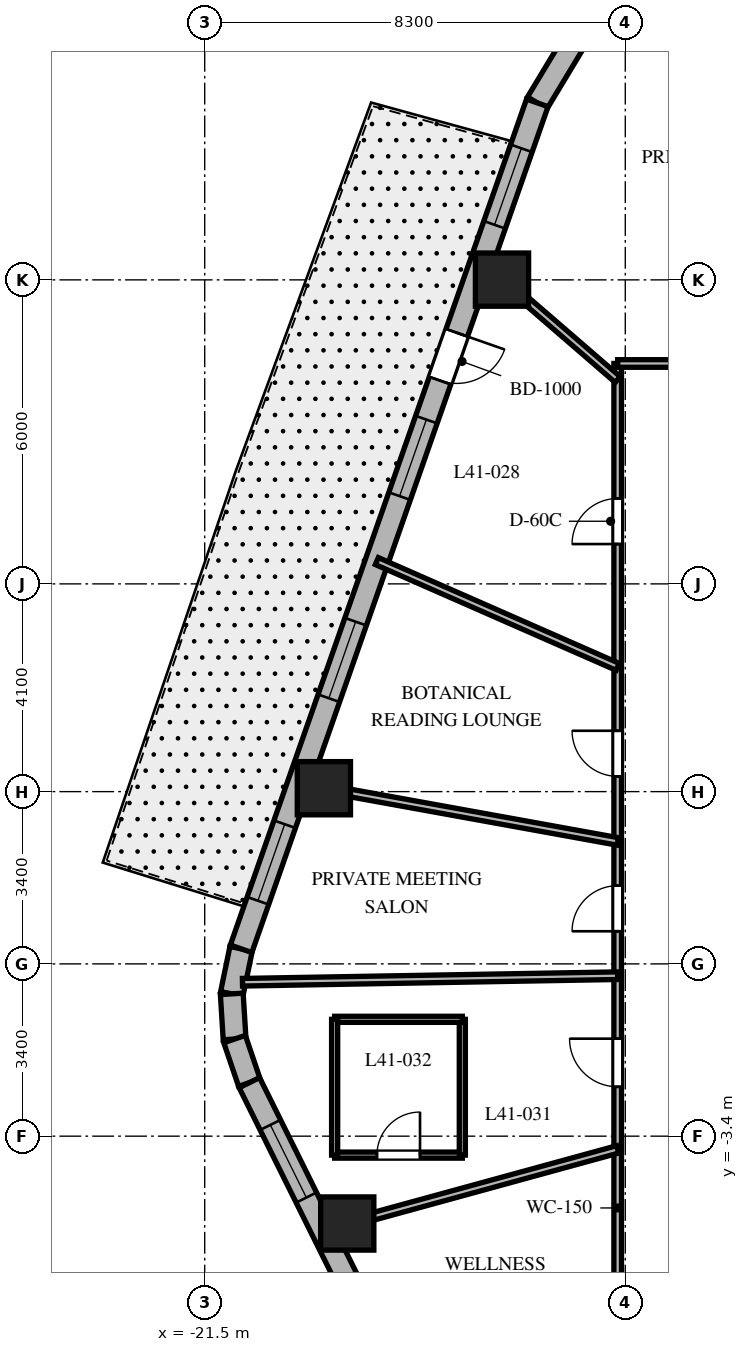
"""IFC4 building model, lengths in metres.
Left out: names, types, materials, properties, quantities, classifications, styles, units other than length and angle.
Written with IfcOpenShell. Run it as: python <this file> out.ifc"""

import sys

from ifc_helpers import new_model, si_unit, direction, frame, frame_2d, origin, origin_2d, place, context, subcontext, project, spatial, rectangle, extrude, element, fill, save


model = new_model("IFC4")
c1 = context("Model", 3, precision=1e-05, world=origin(), true_north=direction((0.0, 1.0)))
c2 = subcontext(c1, "Body", "Model", "MODEL_VIEW")
j1 = project(units=[si_unit("LENGTHUNIT", "METRE"), si_unit("PLANEANGLEUNIT", "RADIAN")], contexts=[c1])
p1 = place(None, origin())
s1 = spatial("IfcSite", under=j1, at=p1, CompositionType="ELEMENT")
p2 = place(p1, origin())
s2 = spatial("IfcBuilding", under=s1, at=p2, CompositionType="ELEMENT")
p3 = place(p2, frame((0.0, 0.0, 166.5)))
s3 = spatial("IfcBuildingStorey", under=s2, at=p3, CompositionType="ELEMENT", Elevation=166.5)
for number, where, z_axis, x_axis in (
    (1, (-15.633, 13.505, 0.0), (0.0, 0.0, 1.0), (1.0, 0.0, 0.0)),
    (2, (-19.148, 3.467, 0.0), (0.0, 0.0, 1.0), (1.0, 0.0, 0.0)),
    (3, (-18.687, -5.124, 0.0), (0.0, 0.0, 1.0), (1.0, 0.0, 0.0)),
):
    element("IfcColumn", number, at=place(p3, frame(where, z_axis=z_axis, x_axis=x_axis)), inside=s3, PredefinedType="COLUMN", context=c2, shape_type="SweptSolid", body=[
        extrude(rectangle(XDim=1.05, YDim=1.05, at=origin_2d()), origin(), (0.0, 0.0, 1.0), 3.7),
    ])
p4 = place(p3, frame((-14.214, 18.192, 0.0), z_axis=(0.0, 0.0, 1.0), x_axis=(-0.516340945502, -0.856383108193, 0.0)))
e4 = element("IfcWall", 4, at=p4, inside=s3, PredefinedType="SOLIDWALL", context=c2, shape_type="SweptSolid", body=[
    extrude(rectangle(XDim=1.4, YDim=0.45, at=frame_2d((0.7, 0.0))), origin(), (0.0, 0.0, 1.0), 3.38),
])
p5 = place(p3, frame((-20.782, 0.298, 0.0), z_axis=(0.0, 0.0, 1.0), x_axis=(-0.202570068411, -0.979267771033, 0.0)))
e5 = element("IfcWall", 5, at=p5, inside=s3, PredefinedType="SOLIDWALL", context=c2, shape_type="SweptSolid", body=[
    extrude(rectangle(XDim=0.909, YDim=0.45, at=frame_2d((0.454, 0.0))), origin(), (0.0, 0.0, 1.0), 3.38),
])
p6 = place(p3, frame((-20.966, -0.592, 0.0), z_axis=(0.0, 0.0, 1.0), x_axis=(0.061748898935, -0.998091715966, 0.0)))
e6 = element("IfcWall", 6, at=p6, inside=s3, PredefinedType="SOLIDWALL", context=c2, shape_type="SweptSolid", body=[
    extrude(rectangle(XDim=0.894, YDim=0.45, at=frame_2d((0.447, 0.0))), origin(), (0.0, 0.0, 1.0), 3.38),
])
p7 = place(p3, frame((-20.911, -1.484, 0.0), z_axis=(0.0, 0.0, 1.0), x_axis=(0.321623334353, -0.946867694453, 0.0)))
e7 = element("IfcWall", 7, at=p7, inside=s3, PredefinedType="SOLIDWALL", context=c2, shape_type="SweptSolid", body=[
    extrude(rectangle(XDim=0.909, YDim=0.45, at=frame_2d((0.454, 0.0))), origin(), (0.0, 0.0, 1.0), 3.38),
])
p8 = place(p3, frame((-14.937, 16.993, 0.0), z_axis=(0.0, 0.0, 1.0), x_axis=(-0.330431575061, -0.943829949834, 0.0)))
e8 = element("IfcWall", 8, at=p8, inside=s3, PredefinedType="SOLIDWALL", context=c2, shape_type="SweptSolid", body=[
    extrude(rectangle(XDim=17.689, YDim=0.45, at=frame_2d((8.844, 0.0))), origin(), (0.0, 0.0, 1.0), 3.38),
])
p9 = place(p8, frame((4.807, 0.0, 0.0)))
e9 = element("IfcOpeningElement", 9, at=p9, cuts=e8, PredefinedType="OPENING", context=c2, shape_type="SweptSolid", body=[
    extrude(rectangle(XDim=1.0, YDim=2.15, at=frame_2d((0.5, 1.075))), frame((0.0, 0.235, 0.0), z_axis=(0.0, -1.0, 0.0), x_axis=(1.0, 0.0, 0.0)), (0.0, 0.0, 1.0), 0.47),
])
p10 = place(p8, frame((0.95, 0.0, 0.8)))
e10 = element("IfcOpeningElement", 10, at=p10, cuts=e8, PredefinedType="OPENING", context=c2, shape_type="SweptSolid", body=[
    extrude(rectangle(XDim=1.6, YDim=1.75, at=frame_2d((0.8, 0.875))), frame((0.0, 0.235, 0.0), z_axis=(0.0, -1.0, 0.0), x_axis=(1.0, 0.0, 0.0)), (0.0, 0.0, 1.0), 0.47),
])
p11 = place(p8, frame((6.623, 0.0, 0.8)))
e11 = element("IfcOpeningElement", 11, at=p11, cuts=e8, PredefinedType="OPENING", context=c2, shape_type="SweptSolid", body=[
    extrude(rectangle(XDim=1.6, YDim=1.75, at=frame_2d((0.8, 0.875))), frame((0.0, 0.235, 0.0), z_axis=(0.0, -1.0, 0.0), x_axis=(1.0, 0.0, 0.0)), (0.0, 0.0, 1.0), 0.47),
])
p12 = place(p8, frame((10.849, 0.0, 0.8)))
e12 = element("IfcOpeningElement", 12, at=p12, cuts=e8, PredefinedType="OPENING", context=c2, shape_type="SweptSolid", body=[
    extrude(rectangle(XDim=1.6, YDim=1.75, at=frame_2d((0.8, 0.875))), frame((0.0, 0.235, 0.0), z_axis=(0.0, -1.0, 0.0), x_axis=(1.0, 0.0, 0.0)), (0.0, 0.0, 1.0), 0.47),
])
p13 = place(p8, frame((15.084, 0.0, 0.8)))
e13 = element("IfcOpeningElement", 13, at=p13, cuts=e8, PredefinedType="OPENING", context=c2, shape_type="SweptSolid", body=[
    extrude(rectangle(XDim=1.6, YDim=1.75, at=frame_2d((0.8, 0.875))), frame((0.0, 0.235, 0.0), z_axis=(0.0, -1.0, 0.0), x_axis=(1.0, 0.0, 0.0)), (0.0, 0.0, 1.0), 0.47),
])
p14 = place(p3, frame((-20.618, -2.344, 0.0), z_axis=(0.0, 0.0, 1.0), x_axis=(0.444243691097, -0.895905990002, 0.0)))
e14 = element("IfcWall", 14, at=p14, inside=s3, PredefinedType="SOLIDWALL", context=c2, shape_type="SweptSolid", body=[
    extrude(rectangle(XDim=16.784, YDim=0.45, at=frame_2d((8.392, 0.0))), origin(), (0.0, 0.0, 1.0), 3.38),
])
p15 = place(p14, frame((0.931, 0.0, 0.8)))
e15 = element("IfcOpeningElement", 15, at=p15, cuts=e14, PredefinedType="OPENING", context=c2, shape_type="SweptSolid", body=[
    extrude(rectangle(XDim=1.6, YDim=1.75, at=frame_2d((0.8, 0.875))), frame((0.0, 0.235, 0.0), z_axis=(0.0, -1.0, 0.0), x_axis=(1.0, 0.0, 0.0)), (0.0, 0.0, 1.0), 0.47),
])
p16 = place(p14, frame((7.642, 0.0, 0.8)))
e16 = element("IfcOpeningElement", 16, at=p16, cuts=e14, PredefinedType="OPENING", context=c2, shape_type="SweptSolid", body=[
    extrude(rectangle(XDim=1.6, YDim=1.75, at=frame_2d((0.8, 0.875))), frame((0.0, 0.235, 0.0), z_axis=(0.0, -1.0, 0.0), x_axis=(1.0, 0.0, 0.0)), (0.0, 0.0, 1.0), 0.47),
])
p17 = place(p14, frame((14.303, 0.0, 0.8)))
e17 = element("IfcOpeningElement", 17, at=p17, cuts=e14, PredefinedType="OPENING", context=c2, shape_type="SweptSolid", body=[
    extrude(rectangle(XDim=1.6, YDim=1.75, at=frame_2d((0.8, 0.875))), frame((0.0, 0.235, 0.0), z_axis=(0.0, -1.0, 0.0), x_axis=(1.0, 0.0, 0.0)), (0.0, 0.0, 1.0), 0.47),
])
p18 = place(p3, frame((-13.35, -11.85, 0.0), z_axis=(0.0, 0.0, 1.0), x_axis=(0.0, 1.0, 0.0)))
e18 = element("IfcWall", 18, at=p18, inside=s3, PredefinedType="PARTITIONING", context=c2, shape_type="SweptSolid", body=[
    extrude(rectangle(XDim=23.7, YDim=0.15, at=frame_2d((11.85, 0.0))), origin(), (0.0, 0.0, 1.0), 2.82),
])
p19 = place(p18, frame((20.136, 0.0, 0.0)))
e19 = element("IfcOpeningElement", 19, at=p19, cuts=e18, PredefinedType="OPENING", context=c2, shape_type="SweptSolid", body=[
    extrude(rectangle(XDim=0.9, YDim=2.03, at=frame_2d((0.45, 1.015))), frame((0.0, 0.085, 0.0), z_axis=(0.0, -1.0, 0.0), x_axis=(1.0, 0.0, 0.0)), (0.0, 0.0, 1.0), 0.17),
])
p20 = place(p18, frame((15.551, 0.0, 0.0)))
e20 = element("IfcOpeningElement", 20, at=p20, cuts=e18, PredefinedType="OPENING", context=c2, shape_type="SweptSolid", body=[
    extrude(rectangle(XDim=0.9, YDim=2.03, at=frame_2d((0.45, 1.015))), frame((0.0, 0.085, 0.0), z_axis=(0.0, -1.0, 0.0), x_axis=(1.0, 0.0, 0.0)), (0.0, 0.0, 1.0), 0.17),
])
p21 = place(p18, frame((12.494, 0.0, 0.0)))
e21 = element("IfcOpeningElement", 21, at=p21, cuts=e18, PredefinedType="OPENING", context=c2, shape_type="SweptSolid", body=[
    extrude(rectangle(XDim=0.9, YDim=2.03, at=frame_2d((0.45, 1.015))), frame((0.0, 0.085, 0.0), z_axis=(0.0, -1.0, 0.0), x_axis=(1.0, 0.0, 0.0)), (0.0, 0.0, 1.0), 0.17),
])
p22 = place(p18, frame((9.424, 0.0, 0.0)))
e22 = element("IfcOpeningElement", 22, at=p22, cuts=e18, PredefinedType="OPENING", context=c2, shape_type="SweptSolid", body=[
    extrude(rectangle(XDim=0.95, YDim=2.03, at=frame_2d((0.475, 1.015))), frame((0.0, 0.085, 0.0), z_axis=(0.0, -1.0, 0.0), x_axis=(1.0, 0.0, 0.0)), (0.0, 0.0, 1.0), 0.17),
])
p23 = place(p18, frame((3.765, 0.0, 0.0)))
e23 = element("IfcOpeningElement", 23, at=p23, cuts=e18, PredefinedType="OPENING", context=c2, shape_type="SweptSolid", body=[
    extrude(rectangle(XDim=0.9, YDim=2.03, at=frame_2d((0.45, 1.015))), frame((0.0, 0.085, 0.0), z_axis=(0.0, -1.0, 0.0), x_axis=(1.0, 0.0, 0.0)), (0.0, 0.0, 1.0), 0.17),
])
p24 = place(p3, frame((-13.35, 11.85, 0.0), z_axis=(0.0, 0.0, 1.0), x_axis=(1.0, 0.0, 0.0)))
e24 = element("IfcWall", 24, at=p24, inside=s3, PredefinedType="PARTITIONING", context=c2, shape_type="SweptSolid", body=[
    extrude(rectangle(XDim=26.7, YDim=0.15, at=frame_2d((13.35, 0.0))), origin(), (0.0, 0.0, 1.0), 2.82),
])
p25 = place(p24, frame((20.682, 0.0, 0.0)))
e25 = element("IfcOpeningElement", 25, at=p25, cuts=e24, PredefinedType="OPENING", context=c2, shape_type="SweptSolid", body=[
    extrude(rectangle(XDim=0.95, YDim=2.03, at=frame_2d((0.475, 1.015))), frame((0.0, 0.085, 0.0), z_axis=(0.0, -1.0, 0.0), x_axis=(1.0, 0.0, 0.0)), (0.0, 0.0, 1.0), 0.17),
])
p26 = place(p24, frame((14.708, 0.0, 0.0)))
e26 = element("IfcOpeningElement", 26, at=p26, cuts=e24, PredefinedType="OPENING", context=c2, shape_type="SweptSolid", body=[
    extrude(rectangle(XDim=0.95, YDim=2.03, at=frame_2d((0.475, 1.015))), frame((0.0, 0.085, 0.0), z_axis=(0.0, -1.0, 0.0), x_axis=(1.0, 0.0, 0.0)), (0.0, 0.0, 1.0), 0.17),
])
p27 = place(p24, frame((10.553, 0.0, 0.0)))
e27 = element("IfcOpeningElement", 27, at=p27, cuts=e24, PredefinedType="OPENING", context=c2, shape_type="SweptSolid", body=[
    extrude(rectangle(XDim=0.95, YDim=2.03, at=frame_2d((0.475, 1.015))), frame((0.0, 0.085, 0.0), z_axis=(0.0, -1.0, 0.0), x_axis=(1.0, 0.0, 0.0)), (0.0, 0.0, 1.0), 0.17),
])
p28 = place(p24, frame((3.995, 0.0, 0.0)))
e28 = element("IfcOpeningElement", 28, at=p28, cuts=e24, PredefinedType="OPENING", context=c2, shape_type="SweptSolid", body=[
    extrude(rectangle(XDim=0.95, YDim=2.03, at=frame_2d((0.475, 1.015))), frame((0.0, 0.085, 0.0), z_axis=(0.0, -1.0, 0.0), x_axis=(1.0, 0.0, 0.0)), (0.0, 0.0, 1.0), 0.17),
])
p29 = place(p3, frame((-13.35, 11.533, 0.0), z_axis=(0.0, 0.0, 1.0), x_axis=(-0.756711647314, 0.65374879183, 0.0)))
e29 = element("IfcWall", 29, at=p29, inside=s3, PredefinedType="PARTITIONING", context=c2, shape_type="SweptSolid", body=[
    extrude(rectangle(XDim=3.55, YDim=0.15, at=frame_2d((1.775, 0.0))), origin(), (0.0, 0.0, 1.0), 2.62),
])
p30 = place(p3, frame((-13.35, 5.863, 0.0), z_axis=(0.0, 0.0, 1.0), x_axis=(-0.9155832175, 0.402128551376, 0.0)))
e30 = element("IfcWall", 30, at=p30, inside=s3, PredefinedType="PARTITIONING", context=c2, shape_type="SweptSolid", body=[
    extrude(rectangle(XDim=5.191, YDim=0.15, at=frame_2d((2.595, 0.0))), origin(), (0.0, 0.0, 1.0), 2.62),
])
p31 = place(p3, frame((-13.35, 2.417, 0.0), z_axis=(0.0, 0.0, 1.0), x_axis=(-0.98399796473, 0.178179699761, 0.0)))
e31 = element("IfcWall", 31, at=p31, inside=s3, PredefinedType="PARTITIONING", context=c2, shape_type="SweptSolid", body=[
    extrude(rectangle(XDim=6.393, YDim=0.15, at=frame_2d((3.197, 0.0))), origin(), (0.0, 0.0, 1.0), 2.62),
])
p32 = place(p3, frame((-13.35, -0.233, 0.0), z_axis=(0.0, 0.0, 1.0), x_axis=(-0.999847932133, -0.017438824797, 0.0)))
e32 = element("IfcWall", 32, at=p32, inside=s3, PredefinedType="PARTITIONING", context=c2, shape_type="SweptSolid", body=[
    extrude(rectangle(XDim=7.406, YDim=0.15, at=frame_2d((3.703, 0.0))), origin(), (0.0, 0.0, 1.0), 2.62),
])
p33 = place(p3, frame((-13.35, -3.661, 0.0), z_axis=(0.0, 0.0, 1.0), x_axis=(-0.964397145454, -0.264458211898, 0.0)))
e33 = element("IfcWall", 33, at=p33, inside=s3, PredefinedType="PARTITIONING", context=c2, shape_type="SweptSolid", body=[
    extrude(rectangle(XDim=6.039, YDim=0.15, at=frame_2d((3.019, 0.0))), origin(), (0.0, 0.0, 1.0), 2.62),
])
p34 = place(p3, frame((-18.936, -3.774, 0.0), z_axis=(0.0, 0.0, 1.0), x_axis=(1.0, 0.0, 0.0)))
e34 = element("IfcWall", 34, at=p34, inside=s3, PredefinedType="PARTITIONING", context=c2, shape_type="SweptSolid", body=[
    extrude(rectangle(XDim=2.52, YDim=0.12, at=frame_2d((1.26, 0.0))), origin(), (0.0, 0.0, 1.0), 2.62),
])
p35 = place(p34, frame((0.835, 0.0, 0.0)))
e35 = element("IfcOpeningElement", 35, at=p35, cuts=e34, PredefinedType="OPENING", context=c2, shape_type="SweptSolid", body=[
    extrude(rectangle(XDim=0.85, YDim=2.03, at=frame_2d((0.425, 1.015))), frame((0.0, 0.07, 0.0), z_axis=(0.0, -1.0, 0.0), x_axis=(1.0, 0.0, 0.0)), (0.0, 0.0, 1.0), 0.14),
])
p36 = place(p3, frame((-16.416, -3.774, 0.0), z_axis=(0.0, 0.0, 1.0), x_axis=(0.0, 1.0, 0.0)))
e36 = element("IfcWall", 36, at=p36, inside=s3, PredefinedType="PARTITIONING", context=c2, shape_type="SweptSolid", body=[
    extrude(rectangle(XDim=2.68, YDim=0.12, at=frame_2d((1.34, 0.0))), origin(), (0.0, 0.0, 1.0), 3.38),
])
p37 = place(p3, frame((-16.416, -1.094, 0.0), z_axis=(0.0, 0.0, 1.0), x_axis=(-1.0, 0.0, 0.0)))
e37 = element("IfcWall", 37, at=p37, inside=s3, PredefinedType="PARTITIONING", context=c2, shape_type="SweptSolid", body=[
    extrude(rectangle(XDim=2.52, YDim=0.12, at=frame_2d((1.26, 0.0))), origin(), (0.0, 0.0, 1.0), 2.62),
])
p38 = place(p3, frame((-18.936, -1.094, 0.0), z_axis=(0.0, 0.0, 1.0), x_axis=(0.0, -1.0, 0.0)))
e38 = element("IfcWall", 38, at=p38, inside=s3, PredefinedType="PARTITIONING", context=c2, shape_type="SweptSolid", body=[
    extrude(rectangle(XDim=2.68, YDim=0.12, at=frame_2d((1.34, 0.0))), origin(), (0.0, 0.0, 1.0), 2.62),
])
p39 = place(p9, origin())
e39 = element("IfcDoor", 39, at=p39, inside=s3, OperationType="SINGLE_SWING_LEFT", PredefinedType="DOOR", context=c2, shape_type="SweptSolid", body=[
    extrude(rectangle(XDim=1.0, YDim=2.15, at=frame_2d((0.5, 1.075))), frame((0.0, 0.025, 0.0), z_axis=(0.0, -1.0, 0.0), x_axis=(1.0, 0.0, 0.0)), (0.0, 0.0, 1.0), 0.05),
])
fill(e9, e39)
p40 = place(p10, origin())
e40 = element("IfcWindow", 40, at=p40, inside=s3, PartitioningType="SINGLE_PANEL", PredefinedType="WINDOW", context=c2, shape_type="SweptSolid", body=[
    extrude(rectangle(XDim=1.6, YDim=1.75, at=frame_2d((0.8, 0.875))), frame((0.0, 0.03, 0.0), z_axis=(0.0, -1.0, 0.0), x_axis=(1.0, 0.0, 0.0)), (0.0, 0.0, 1.0), 0.06),
])
fill(e10, e40)
p41 = place(p11, origin())
e41 = element("IfcWindow", 41, at=p41, inside=s3, PartitioningType="SINGLE_PANEL", PredefinedType="WINDOW", context=c2, shape_type="SweptSolid", body=[
    extrude(rectangle(XDim=1.6, YDim=1.75, at=frame_2d((0.8, 0.875))), frame((0.0, 0.03, 0.0), z_axis=(0.0, -1.0, 0.0), x_axis=(1.0, 0.0, 0.0)), (0.0, 0.0, 1.0), 0.06),
])
fill(e11, e41)
p42 = place(p12, origin())
e42 = element("IfcWindow", 42, at=p42, inside=s3, PartitioningType="SINGLE_PANEL", PredefinedType="WINDOW", context=c2, shape_type="SweptSolid", body=[
    extrude(rectangle(XDim=1.6, YDim=1.75, at=frame_2d((0.8, 0.875))), frame((0.0, 0.03, 0.0), z_axis=(0.0, -1.0, 0.0), x_axis=(1.0, 0.0, 0.0)), (0.0, 0.0, 1.0), 0.06),
])
fill(e12, e42)
p43 = place(p13, origin())
e43 = element("IfcWindow", 43, at=p43, inside=s3, PartitioningType="SINGLE_PANEL", PredefinedType="WINDOW", context=c2, shape_type="SweptSolid", body=[
    extrude(rectangle(XDim=1.6, YDim=1.75, at=frame_2d((0.8, 0.875))), frame((0.0, 0.03, 0.0), z_axis=(0.0, -1.0, 0.0), x_axis=(1.0, 0.0, 0.0)), (0.0, 0.0, 1.0), 0.06),
])
fill(e13, e43)
p44 = place(p15, origin())
e44 = element("IfcWindow", 44, at=p44, inside=s3, PartitioningType="SINGLE_PANEL", PredefinedType="WINDOW", context=c2, shape_type="SweptSolid", body=[
    extrude(rectangle(XDim=1.6, YDim=1.75, at=frame_2d((0.8, 0.875))), frame((0.0, 0.03, 0.0), z_axis=(0.0, -1.0, 0.0), x_axis=(1.0, 0.0, 0.0)), (0.0, 0.0, 1.0), 0.06),
])
fill(e15, e44)
p45 = place(p19, origin())
e45 = element("IfcDoor", 45, at=p45, inside=s3, OperationType="SINGLE_SWING_LEFT", PredefinedType="DOOR", context=c2, shape_type="SweptSolid", body=[
    extrude(rectangle(XDim=0.9, YDim=2.03, at=frame_2d((0.45, 1.015))), frame((0.0, 0.025, 0.0), z_axis=(0.0, -1.0, 0.0), x_axis=(1.0, 0.0, 0.0)), (0.0, 0.0, 1.0), 0.05),
])
fill(e19, e45)
p46 = place(p20, origin())
e46 = element("IfcDoor", 46, at=p46, inside=s3, OperationType="SINGLE_SWING_RIGHT", PredefinedType="DOOR", context=c2, shape_type="SweptSolid", body=[
    extrude(rectangle(XDim=0.9, YDim=2.03, at=frame_2d((0.45, 1.015))), frame((0.0, 0.025, 0.0), z_axis=(0.0, -1.0, 0.0), x_axis=(1.0, 0.0, 0.0)), (0.0, 0.0, 1.0), 0.05),
])
fill(e20, e46)
p47 = place(p21, origin())
e47 = element("IfcDoor", 47, at=p47, inside=s3, OperationType="SINGLE_SWING_LEFT", PredefinedType="DOOR", context=c2, shape_type="SweptSolid", body=[
    extrude(rectangle(XDim=0.9, YDim=2.03, at=frame_2d((0.45, 1.015))), frame((0.0, 0.025, 0.0), z_axis=(0.0, -1.0, 0.0), x_axis=(1.0, 0.0, 0.0)), (0.0, 0.0, 1.0), 0.05),
])
fill(e21, e47)
p48 = place(p22, origin())
e48 = element("IfcDoor", 48, at=p48, inside=s3, OperationType="SINGLE_SWING_RIGHT", PredefinedType="DOOR", context=c2, shape_type="SweptSolid", body=[
    extrude(rectangle(XDim=0.95, YDim=2.03, at=frame_2d((0.475, 1.015))), frame((0.0, 0.025, 0.0), z_axis=(0.0, -1.0, 0.0), x_axis=(1.0, 0.0, 0.0)), (0.0, 0.0, 1.0), 0.05),
])
fill(e22, e48)
p49 = place(p35, origin())
e49 = element("IfcDoor", 49, at=p49, inside=s3, OperationType="SINGLE_SWING_RIGHT", PredefinedType="DOOR", context=c2, shape_type="SweptSolid", body=[
    extrude(rectangle(XDim=0.85, YDim=2.03, at=frame_2d((0.425, 1.015))), frame((0.0, 0.025, 0.0), z_axis=(0.0, -1.0, 0.0), x_axis=(1.0, 0.0, 0.0)), (0.0, 0.0, 1.0), 0.05),
])
fill(e35, e49)
save(model, sys.argv[1])
